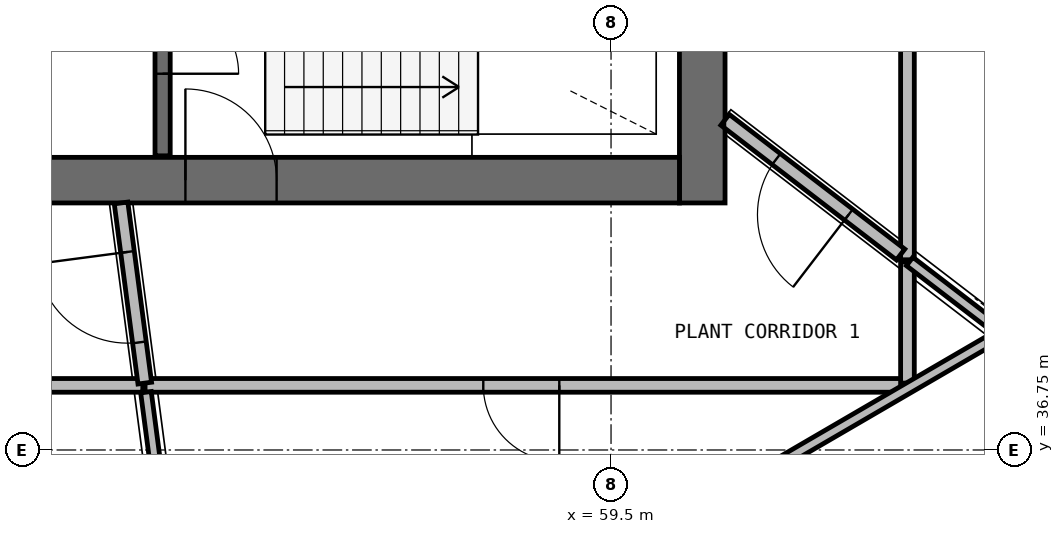
"""IFC4 building model, lengths in metres.
Left out: names, types, materials, properties, quantities, classifications, styles, units other than length and angle.
Written with IfcOpenShell. Run it as: python <this file> out.ifc"""

import sys

from ifc_helpers import new_model, si_unit, direction, frame, frame_2d, origin, place, context, subcontext, project, spatial, rectangle, extrude, source, transform, mapped, element, fill, save


model = new_model("IFC4")
c1 = context("Model", 3, precision=1e-05, world=origin(), true_north=direction((0.0, 1.0)))
c2 = subcontext(c1, "Body", "Model", "MODEL_VIEW")
j1 = project(units=[si_unit("LENGTHUNIT", "METRE"), si_unit("PLANEANGLEUNIT", "RADIAN")], contexts=[c1])
p1 = place(None, origin())
s1 = spatial("IfcSite", under=j1, at=p1, CompositionType="ELEMENT")
p2 = place(p1, origin())
s2 = spatial("IfcBuilding", under=s1, at=p2, CompositionType="ELEMENT")
p3 = place(p2, frame((0.0, 0.0, 230.6)))
s3 = spatial("IfcBuildingStorey", under=s2, at=p3, CompositionType="ELEMENT", Elevation=230.6)
p4 = place(p3, frame((60.7, 40.0, 0.0), z_axis=(0.0, 0.0, 1.0), x_axis=(0.0, 1.0, 0.0)))
e1 = element("IfcWall", 1, at=p4, inside=s3, PredefinedType="SHEAR", context=c2, shape_type="SweptSolid", body=[
    extrude(rectangle(XDim=16.0, YDim=0.6, at=frame_2d((8.0, 0.0))), origin(), (0.0, 0.0, 1.0), 3.9),
])
p5 = place(p4, frame((7.1, 0.0, 0.0)))
e2 = element("IfcOpeningElement", 2, at=p5, cuts=e1, PredefinedType="OPENING", context=c2, shape_type="SweptSolid", body=[
    extrude(rectangle(XDim=1.8, YDim=2.1, at=frame_2d((0.9, 1.05))), frame((0.0, 0.31, 0.0), z_axis=(0.0, -1.0, 0.0), x_axis=(1.0, 0.0, 0.0)), (0.0, 0.0, 1.0), 0.62),
])
p6 = place(p3, frame((43.6, 40.3, 0.0), z_axis=(0.0, 0.0, 1.0), x_axis=(1.0, 0.0, 0.0)))
e3 = element("IfcWall", 3, at=p6, inside=s3, PredefinedType="SHEAR", context=c2, shape_type="SweptSolid", body=[
    extrude(rectangle(XDim=16.8, YDim=0.6, at=frame_2d((8.4, 0.0))), origin(), (0.0, 0.0, 1.0), 3.9),
])
p7 = place(p6, frame((10.3, 0.0, 0.0)))
e4 = element("IfcOpeningElement", 4, at=p7, cuts=e3, PredefinedType="OPENING", context=c2, shape_type="SweptSolid", body=[
    extrude(rectangle(XDim=1.2, YDim=2.1, at=frame_2d((0.6, 1.05))), frame((0.0, 0.31, 0.0), z_axis=(0.0, -1.0, 0.0), x_axis=(1.0, 0.0, 0.0)), (0.0, 0.0, 1.0), 0.62),
])
p8 = place(p6, frame((7.25, 0.0, 0.0)))
e5 = element("IfcOpeningElement", 5, at=p8, cuts=e3, PredefinedType="OPENING", context=c2, shape_type="SweptSolid", body=[
    extrude(rectangle(XDim=1.1, YDim=2.1, at=frame_2d((0.55, 1.05))), frame((0.0, 0.31, 0.0), z_axis=(0.0, -1.0, 0.0), x_axis=(1.0, 0.0, 0.0)), (0.0, 0.0, 1.0), 0.62),
])
p9 = place(p6, frame((0.7, 0.0, 0.0)))
e6 = element("IfcOpeningElement", 6, at=p9, cuts=e3, PredefinedType="OPENING", context=c2, shape_type="SweptSolid", body=[
    extrude(rectangle(XDim=0.8, YDim=2.1, at=frame_2d((0.4, 1.05))), frame((0.0, 0.31, 0.0), z_axis=(0.0, -1.0, 0.0), x_axis=(1.0, 0.0, 0.0)), (0.0, 0.0, 1.0), 0.62),
])
p10 = place(p3, frame((53.6, 43.6, 0.0), z_axis=(0.0, 0.0, 1.0), x_axis=(0.0, -1.0, 0.0)))
e7 = element("IfcWall", 7, at=p10, inside=s3, PredefinedType="SOLIDWALL", context=c2, shape_type="SweptSolid", body=[
    extrude(rectangle(XDim=2.98, YDim=0.2, at=frame_2d((1.49, 0.0))), origin(), (0.0, 0.0, 1.0), 3.58),
])
p11 = place(p10, frame((0.9, 0.0, 0.0)))
e8 = element("IfcOpeningElement", 8, at=p11, cuts=e7, PredefinedType="OPENING", context=c2, shape_type="SweptSolid", body=[
    extrude(rectangle(XDim=1.0, YDim=2.1, at=frame_2d((0.5, 1.05))), frame((0.0, 0.11, 0.0), z_axis=(0.0, -1.0, 0.0), x_axis=(1.0, 0.0, 0.0)), (0.0, 0.0, 1.0), 0.22),
])
p12 = place(p3, frame((63.4, 49.501, 0.0), z_axis=(0.0, 0.0, 1.0), x_axis=(0.0, -1.0, 0.0)))
e9 = element("IfcWall", 9, at=p12, inside=s3, PredefinedType="PARTITIONING", context=c2, shape_type="SweptSolid", body=[
    extrude(rectangle(XDim=10.248, YDim=0.18, at=frame_2d((5.124, 0.0))), origin(), (0.0, 0.0, 1.0), 2.38),
])
p13 = place(p12, frame((4.598, 0.0, 0.0)))
e10 = element("IfcOpeningElement", 10, at=p13, cuts=e9, PredefinedType="OPENING", context=c2, shape_type="SweptSolid", body=[
    extrude(rectangle(XDim=1.0, YDim=2.1, at=frame_2d((0.5, 1.05))), frame((0.0, 0.1, 0.0), z_axis=(0.0, -1.0, 0.0), x_axis=(1.0, 0.0, 0.0)), (0.0, 0.0, 1.0), 0.2),
])
p14 = place(p3, frame((63.4, 37.6, 0.0), z_axis=(0.0, 0.0, 1.0), x_axis=(-1.0, 0.0, 0.0)))
e11 = element("IfcWall", 11, at=p14, inside=s3, PredefinedType="PARTITIONING", context=c2, shape_type="SweptSolid", body=[
    extrude(rectangle(XDim=10.031, YDim=0.18, at=frame_2d((5.015, 0.0))), origin(), (0.0, 0.0, 1.0), 2.38),
])
p15 = place(p14, frame((4.581, 0.0, 0.0)))
e12 = element("IfcOpeningElement", 12, at=p15, cuts=e11, PredefinedType="OPENING", context=c2, shape_type="SweptSolid", body=[
    extrude(rectangle(XDim=1.0, YDim=2.1, at=frame_2d((0.5, 1.05))), frame((0.0, 0.1, 0.0), z_axis=(0.0, -1.0, 0.0), x_axis=(1.0, 0.0, 0.0)), (0.0, 0.0, 1.0), 0.2),
])
p16 = place(p3, frame((53.339, 37.6, 0.0), z_axis=(0.0, 0.0, 1.0), x_axis=(-1.0, 0.0, 0.0)))
e13 = element("IfcWall", 13, at=p16, inside=s3, PredefinedType="PARTITIONING", context=c2, shape_type="SweptSolid", body=[
    extrude(rectangle(XDim=9.319, YDim=0.18, at=frame_2d((4.66, 0.0))), origin(), (0.0, 0.0, 1.0), 2.38),
])
p17 = place(p16, frame((4.069, 0.0, 0.0)))
e14 = element("IfcOpeningElement", 14, at=p17, cuts=e13, PredefinedType="OPENING", context=c2, shape_type="SweptSolid", body=[
    extrude(rectangle(XDim=1.0, YDim=2.1, at=frame_2d((0.5, 1.05))), frame((0.0, 0.1, 0.0), z_axis=(0.0, -1.0, 0.0), x_axis=(1.0, 0.0, 0.0)), (0.0, 0.0, 1.0), 0.2),
])
p18 = place(p3, frame((63.31, 39.322, 0.0), z_axis=(0.0, 0.0, 1.0), x_axis=(-0.793371480341, 0.608737787706, 0.0)))
e15 = element("IfcWall", 15, at=p18, inside=s3, PredefinedType="PARTITIONING", context=c2, shape_type="SweptSolid", body=[
    extrude(rectangle(XDim=2.912, YDim=0.18, at=frame_2d((1.456, 0.0))), origin(), (0.0, 0.0, 1.0), 2.38),
])
p19 = place(p18, frame((0.862, 0.0, 0.0)))
e16 = element("IfcOpeningElement", 16, at=p19, cuts=e15, PredefinedType="OPENING", context=c2, shape_type="SweptSolid", body=[
    extrude(rectangle(XDim=1.2, YDim=2.1, at=frame_2d((0.6, 1.05))), frame((0.0, 0.1, 0.0), z_axis=(0.0, -1.0, 0.0), x_axis=(1.0, 0.0, 0.0)), (0.0, 0.0, 1.0), 0.2),
])
p20 = place(p3, frame((53.365, 37.63, 0.0), z_axis=(0.0, 0.0, 1.0), x_axis=(-0.130504701654, 0.991447690424, 0.0)))
e17 = element("IfcWall", 17, at=p20, inside=s3, PredefinedType="PARTITIONING", context=c2, shape_type="SweptSolid", body=[
    extrude(rectangle(XDim=2.391, YDim=0.18, at=frame_2d((1.195, 0.0))), origin(), (0.0, 0.0, 1.0), 2.38),
])
p21 = place(p20, frame((0.541, 0.0, 0.0)))
e18 = element("IfcOpeningElement", 18, at=p21, cuts=e17, PredefinedType="OPENING", context=c2, shape_type="SweptSolid", body=[
    extrude(rectangle(XDim=1.2, YDim=2.1, at=frame_2d((0.6, 1.05))), frame((0.0, 0.1, 0.0), z_axis=(0.0, -1.0, 0.0), x_axis=(1.0, 0.0, 0.0)), (0.0, 0.0, 1.0), 0.2),
])
p22 = place(p3, frame((63.4, 37.63, 0.0), z_axis=(0.0, 0.0, 1.0), x_axis=(0.0, 1.0, 0.0)))
e19 = element("IfcWall", 19, at=p22, inside=s3, PredefinedType="PARTITIONING", context=c2, shape_type="SweptSolid", body=[
    extrude(rectangle(XDim=1.593, YDim=0.18, at=frame_2d((0.796, 0.0))), origin(), (0.0, 0.0, 1.0), 2.38),
])
p23 = place(p3, frame((61.058, 36.195, 0.0), z_axis=(0.0, 0.0, 1.0), x_axis=(0.864208311026, 0.503134172118, 0.0)))
e20 = element("IfcWall", 20, at=p23, inside=s3, PredefinedType="PARTITIONING", context=c2, shape_type="SweptSolid", body=[
    extrude(rectangle(XDim=4.162, YDim=0.14, at=frame_2d((2.081, 0.0))), origin(), (0.0, 0.0, 1.0), 2.38),
])
p24 = place(p3, frame((53.381, 37.51, 0.0), z_axis=(0.0, 0.0, 1.0), x_axis=(0.130471833124, -0.991452016369, 0.0)))
e21 = element("IfcWall", 21, at=p24, inside=s3, PredefinedType="PARTITIONING", context=c2, shape_type="SweptSolid", body=[
    extrude(rectangle(XDim=2.552, YDim=0.14, at=frame_2d((1.276, 0.0))), origin(), (0.0, 0.0, 1.0), 2.38),
])
p25 = place(p3, frame((63.429, 39.23, 0.0), z_axis=(0.0, 0.0, 1.0), x_axis=(0.793395131444, -0.608706961847, 0.0)))
e22 = element("IfcWall", 22, at=p25, inside=s3, PredefinedType="PARTITIONING", context=c2, shape_type="SweptSolid", body=[
    extrude(rectangle(XDim=1.47, YDim=0.14, at=frame_2d((0.735, 0.0))), origin(), (0.0, 0.0, 1.0), 2.38),
])
m1 = source(origin(), c2, "Body", "SweptSolid", [
    extrude(rectangle(XDim=1.2, YDim=2.1, at=frame_2d((0.6, 1.05))), frame((0.0, 0.025, 0.0), z_axis=(0.0, -1.0, 0.0), x_axis=(1.0, 0.0, 0.0)), (0.0, 0.0, 1.0), 0.05),
])
p26 = place(p7, origin())
e23 = element("IfcDoor", 23, at=p26, inside=s3, OperationType="SINGLE_SWING_LEFT", PredefinedType="DOOR", context=c2, shape_type="MappedRepresentation", body=[
    mapped(m1, transform((0.0, 0.0, 0.0), scale=1.0)),
])
fill(e4, e23)
m2 = source(origin(), c2, "Body", "SweptSolid", [
    extrude(rectangle(XDim=1.0, YDim=2.1, at=frame_2d((0.5, 1.05))), frame((0.0, 0.025, 0.0), z_axis=(0.0, -1.0, 0.0), x_axis=(1.0, 0.0, 0.0)), (0.0, 0.0, 1.0), 0.05),
])
p27 = place(p11, origin())
e24 = element("IfcDoor", 24, at=p27, inside=s3, OperationType="SINGLE_SWING_RIGHT", PredefinedType="DOOR", context=c2, shape_type="MappedRepresentation", body=[
    mapped(m2, transform((0.0, 0.0, 0.0), scale=1.0)),
])
fill(e8, e24)
m3 = source(origin(), c2, "Body", "SweptSolid", [
    extrude(rectangle(XDim=1.0, YDim=2.1, at=frame_2d((0.5, 1.05))), frame((0.0, 0.025, 0.0), z_axis=(0.0, -1.0, 0.0), x_axis=(1.0, 0.0, 0.0)), (0.0, 0.0, 1.0), 0.05),
])
p28 = place(p15, origin())
e25 = element("IfcDoor", 25, at=p28, inside=s3, OperationType="SINGLE_SWING_LEFT", PredefinedType="DOOR", context=c2, shape_type="MappedRepresentation", body=[
    mapped(m3, transform((0.0, 0.0, 0.0), scale=1.0)),
])
fill(e12, e25)
m4 = source(origin(), c2, "Body", "SweptSolid", [
    extrude(rectangle(XDim=1.2, YDim=2.1, at=frame_2d((0.6, 1.05))), frame((0.0, 0.025, 0.0), z_axis=(0.0, -1.0, 0.0), x_axis=(1.0, 0.0, 0.0)), (0.0, 0.0, 1.0), 0.05),
])
p29 = place(p21, origin())
e26 = element("IfcDoor", 26, at=p29, inside=s3, OperationType="SINGLE_SWING_RIGHT", PredefinedType="DOOR", context=c2, shape_type="MappedRepresentation", body=[
    mapped(m4, transform((0.0, 0.0, 0.0), scale=1.0)),
])
fill(e18, e26)
p30 = place(p19, origin())
e27 = element("IfcDoor", 27, at=p30, inside=s3, OperationType="SINGLE_SWING_LEFT", PredefinedType="DOOR", context=c2, shape_type="MappedRepresentation", body=[
    mapped(m4, transform((0.0, 0.0, 0.0), scale=1.0)),
])
fill(e16, e27)
save(model, sys.argv[1])
